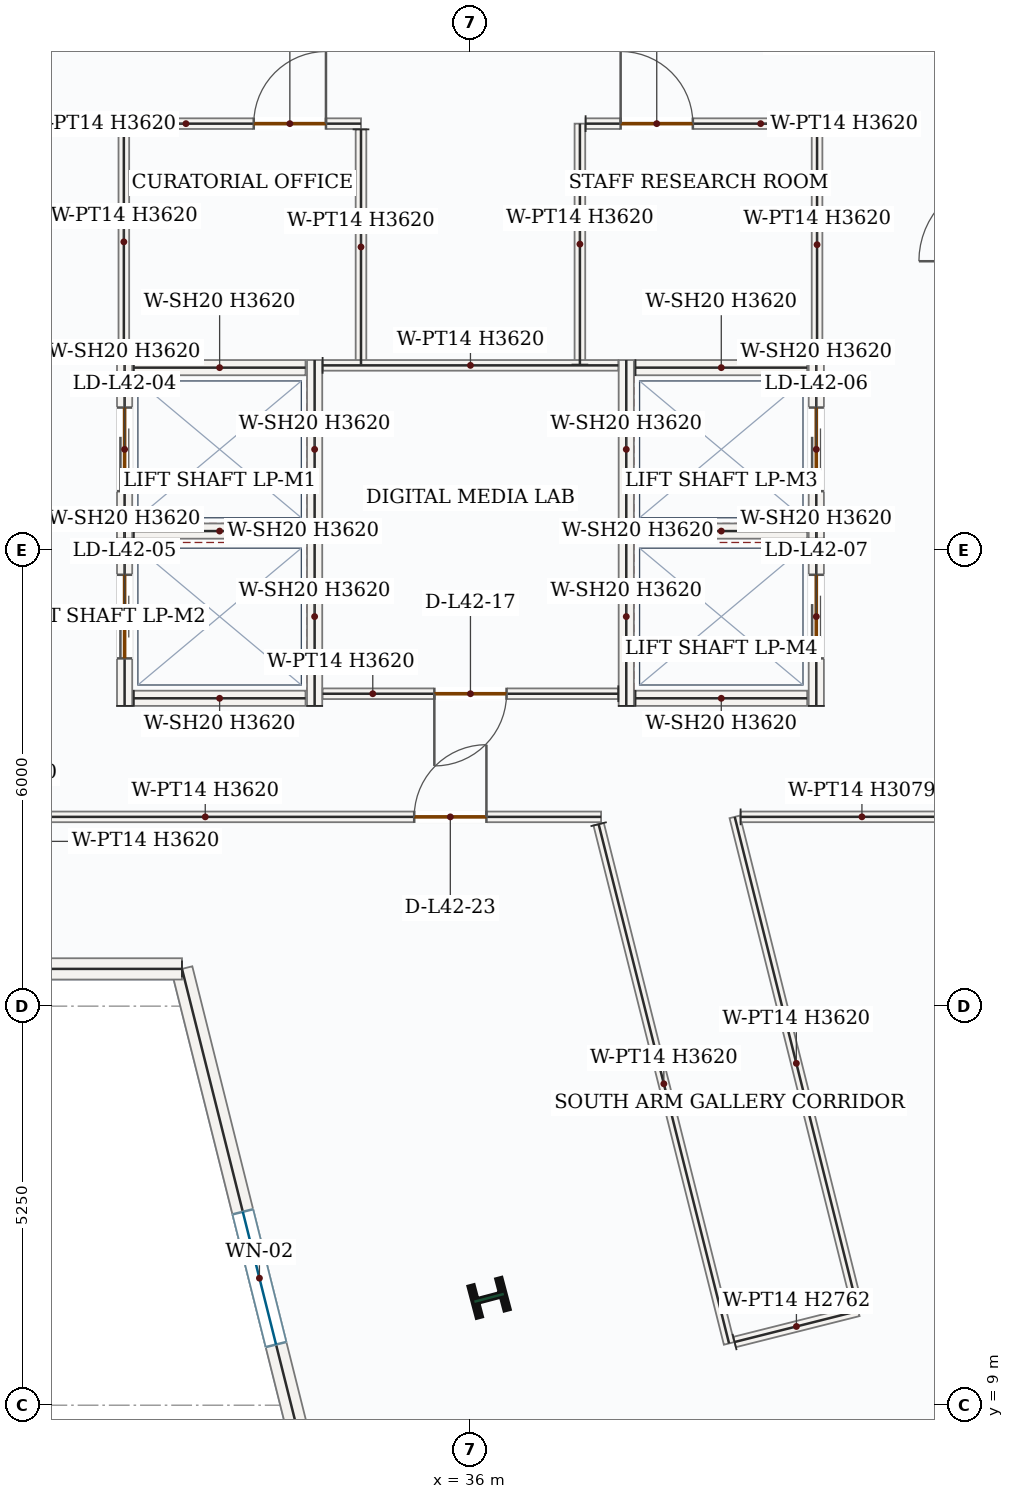
"""IFC4 building model, lengths in metres.
Left out: names, types, materials, properties, quantities, classifications, styles, units other than length and angle.
Written with IfcOpenShell. Run it as: python <this file> out.ifc"""

import sys

from ifc_helpers import new_model, si_unit, direction, frame, frame_2d, origin, origin_2d, place, context, subcontext, project, spatial, rectangle, i_section, extrude, source, transform, mapped, element, fill, save


model = new_model("IFC4")
c1 = context("Model", 3, precision=1e-05, world=origin(), true_north=direction((0.0, 1.0)))
c2 = subcontext(c1, "Body", "Model", "MODEL_VIEW")
j1 = project(units=[si_unit("LENGTHUNIT", "METRE"), si_unit("PLANEANGLEUNIT", "RADIAN")], contexts=[c1])
p1 = place(None, origin())
s1 = spatial("IfcSite", under=j1, at=p1, CompositionType="ELEMENT")
p2 = place(p1, origin())
s2 = spatial("IfcBuilding", under=s1, at=p2, CompositionType="ELEMENT")
p3 = place(p2, frame((0.0, 0.0, 182.4)))
s3 = spatial("IfcBuildingStorey", under=s2, at=p3, CompositionType="ELEMENT", Elevation=182.4)
m1 = source(origin(), c2, "Body", "SweptSolid", [
    extrude(i_section(OverallWidth=0.412, OverallDepth=0.435, WebThickness=0.036, FlangeThickness=0.057, FilletRadius=0.018, at=origin_2d()), origin(), (0.0, 0.0, 1.0), 3.9),
])
p4 = place(p3, frame((36.245, 10.412, 0.0), z_axis=(0.0, 0.0, 1.0), x_axis=(-0.255445757936, 0.966823388604, 0.0)))
e1 = element("IfcColumn", 1, at=p4, inside=s3, PredefinedType="COLUMN", context=c2, shape_type="MappedRepresentation", body=[
    mapped(m1, transform((0.0, 0.0, 0.0), x_axis=(1.0, 0.0, 0.0), y_axis=(0.0, 1.0, 0.0), z_axis=(0.0, 0.0, 1.0), scale=1.0)),
])
p5 = place(p3, frame((34.243, 6.602, 0.0), z_axis=(0.0, 0.0, 1.0), x_axis=(-0.242939601766, 0.970041416587, 0.0)))
e2 = element("IfcWall", 2, at=p5, inside=s3, PredefinedType="SOLIDWALL", context=c2, shape_type="SweptSolid", body=[
    extrude(rectangle(XDim=8.389, YDim=0.28, at=frame_2d((4.195, 0.0))), origin(), (0.0, 0.0, 1.0), 3.62),
])
p6 = place(p5, frame((3.295, 0.0, 0.85)))
e3 = element("IfcOpeningElement", 3, at=p6, cuts=e2, PredefinedType="OPENING", context=c2, shape_type="SweptSolid", body=[
    extrude(rectangle(XDim=1.8, YDim=1.75, at=frame_2d((0.9, 0.875))), frame((0.0, 0.15, 0.0), z_axis=(0.0, -1.0, 0.0), x_axis=(1.0, 0.0, 0.0)), (0.0, 0.0, 1.0), 0.3),
])
p7 = place(p3, frame((32.205, 14.74, 0.0), z_axis=(0.0, 0.0, 1.0), x_axis=(-1.0, 0.0, 0.0)))
e4 = element("IfcWall", 4, at=p7, inside=s3, PredefinedType="SOLIDWALL", context=c2, shape_type="SweptSolid", body=[
    extrude(rectangle(XDim=9.547, YDim=0.28, at=frame_2d((4.773, 0.0))), origin(), (0.0, 0.0, 1.0), 3.62),
])
p8 = place(p7, frame((3.873, 0.0, 0.85)))
e5 = element("IfcOpeningElement", 5, at=p8, cuts=e4, PredefinedType="OPENING", context=c2, shape_type="SweptSolid", body=[
    extrude(rectangle(XDim=1.8, YDim=1.75, at=frame_2d((0.9, 0.875))), frame((0.0, 0.15, 0.0), z_axis=(0.0, -1.0, 0.0), x_axis=(1.0, 0.0, 0.0)), (0.0, 0.0, 1.0), 0.3),
])
p9 = place(p3, frame((31.45, 20.4, 0.0), z_axis=(0.0, 0.0, 1.0), x_axis=(0.0, 1.0, 0.0)))
e6 = element("IfcWall", 6, at=p9, inside=s3, PredefinedType="SOLIDWALL", context=c2, shape_type="SweptSolid", body=[
    extrude(rectangle(XDim=2.35, YDim=0.2, at=frame_2d((1.175, 0.0))), origin(), (0.0, 0.0, 1.0), 3.62),
])
p10 = place(p9, frame((0.625, 0.0, 0.0)))
e7 = element("IfcOpeningElement", 7, at=p10, cuts=e6, PredefinedType="OPENING", context=c2, shape_type="SweptSolid", body=[
    extrude(rectangle(XDim=1.1, YDim=2.15, at=frame_2d((0.55, 1.075))), frame((0.0, 0.11, 0.0), z_axis=(0.0, -1.0, 0.0), x_axis=(1.0, 0.0, 0.0)), (0.0, 0.0, 1.0), 0.22),
])
m2 = source(origin(), c2, "Body", "SweptSolid", [
    extrude(rectangle(XDim=2.35, YDim=0.2, at=frame_2d((1.175, 0.0))), origin(), (0.0, 0.0, 1.0), 3.62),
])
p11 = place(p3, frame((33.95, 20.4, 0.0), z_axis=(0.0, 0.0, 1.0), x_axis=(0.0, 1.0, 0.0)))
e8 = element("IfcWall", 8, at=p11, inside=s3, PredefinedType="SOLIDWALL", context=c2, shape_type="MappedRepresentation", body=[
    mapped(m2, transform((0.0, 0.0, 0.0), x_axis=(1.0, 0.0, 0.0), y_axis=(0.0, 1.0, 0.0), z_axis=(0.0, 0.0, 1.0), scale=1.0)),
])
m3 = source(origin(), c2, "Body", "SweptSolid", [
    extrude(rectangle(XDim=2.26, YDim=0.2, at=frame_2d((1.13, 0.0))), origin(), (0.0, 0.0, 1.0), 3.62),
])
for number, where, z_axis, x_axis in (
    (9, (31.57, 20.5, 0.0), (0.0, 0.0, 1.0), (1.0, 0.0, 0.0)),
    (10, (31.57, 22.65, 0.0), (0.0, 0.0, 1.0), (1.0, 0.0, 0.0)),
):
    element("IfcWall", number, at=place(p3, frame(where, z_axis=z_axis, x_axis=x_axis)), inside=s3, PredefinedType="SOLIDWALL", context=c2, shape_type="MappedRepresentation", body=[
        mapped(m3, transform((0.0, 0.0, 0.0), x_axis=(1.0, 0.0, 0.0), y_axis=(0.0, 1.0, 0.0), z_axis=(0.0, 0.0, 1.0), scale=1.0)),
    ])
p12 = place(p3, frame((31.45, 18.2, 0.0), z_axis=(0.0, 0.0, 1.0), x_axis=(0.0, 1.0, 0.0)))
e11 = element("IfcWall", 11, at=p12, inside=s3, PredefinedType="SOLIDWALL", context=c2, shape_type="SweptSolid", body=[
    extrude(rectangle(XDim=2.35, YDim=0.2, at=frame_2d((1.175, 0.0))), origin(), (0.0, 0.0, 1.0), 3.62),
])
p13 = place(p12, frame((0.625, 0.0, 0.0)))
e12 = element("IfcOpeningElement", 12, at=p13, cuts=e11, PredefinedType="OPENING", context=c2, shape_type="SweptSolid", body=[
    extrude(rectangle(XDim=1.1, YDim=2.15, at=frame_2d((0.55, 1.075))), frame((0.0, 0.11, 0.0), z_axis=(0.0, -1.0, 0.0), x_axis=(1.0, 0.0, 0.0)), (0.0, 0.0, 1.0), 0.22),
])
p14 = place(p3, frame((33.95, 18.2, 0.0), z_axis=(0.0, 0.0, 1.0), x_axis=(0.0, 1.0, 0.0)))
e13 = element("IfcWall", 13, at=p14, inside=s3, PredefinedType="SOLIDWALL", context=c2, shape_type="MappedRepresentation", body=[
    mapped(m2, transform((0.0, 0.0, 0.0), x_axis=(1.0, 0.0, 0.0), y_axis=(0.0, 1.0, 0.0), z_axis=(0.0, 0.0, 1.0), scale=1.0)),
])
p15 = place(p3, frame((31.57, 18.3, 0.0), z_axis=(0.0, 0.0, 1.0), x_axis=(1.0, 0.0, 0.0)))
e14 = element("IfcWall", 14, at=p15, inside=s3, PredefinedType="SOLIDWALL", context=c2, shape_type="MappedRepresentation", body=[
    mapped(m3, transform((0.0, 0.0, 0.0), x_axis=(1.0, 0.0, 0.0), y_axis=(0.0, 1.0, 0.0), z_axis=(0.0, 0.0, 1.0), scale=1.0)),
])
p16 = place(p3, frame((38.05, 20.4, 0.0), z_axis=(0.0, 0.0, 1.0), x_axis=(0.0, 1.0, 0.0)))
e15 = element("IfcWall", 15, at=p16, inside=s3, PredefinedType="SOLIDWALL", context=c2, shape_type="MappedRepresentation", body=[
    mapped(m2, transform((0.0, 0.0, 0.0), x_axis=(1.0, 0.0, 0.0), y_axis=(0.0, 1.0, 0.0), z_axis=(0.0, 0.0, 1.0), scale=1.0)),
])
p17 = place(p3, frame((40.55, 20.4, 0.0), z_axis=(0.0, 0.0, 1.0), x_axis=(0.0, 1.0, 0.0)))
e16 = element("IfcWall", 16, at=p17, inside=s3, PredefinedType="SOLIDWALL", context=c2, shape_type="SweptSolid", body=[
    extrude(rectangle(XDim=2.35, YDim=0.2, at=frame_2d((1.175, 0.0))), origin(), (0.0, 0.0, 1.0), 3.62),
])
p18 = place(p17, frame((0.625, 0.0, 0.0)))
e17 = element("IfcOpeningElement", 17, at=p18, cuts=e16, PredefinedType="OPENING", context=c2, shape_type="SweptSolid", body=[
    extrude(rectangle(XDim=1.1, YDim=2.15, at=frame_2d((0.55, 1.075))), frame((0.0, 0.11, 0.0), z_axis=(0.0, -1.0, 0.0), x_axis=(1.0, 0.0, 0.0)), (0.0, 0.0, 1.0), 0.22),
])
for number, where, z_axis, x_axis in (
    (18, (38.17, 20.5, 0.0), (0.0, 0.0, 1.0), (1.0, 0.0, 0.0)),
    (19, (38.17, 22.65, 0.0), (0.0, 0.0, 1.0), (1.0, 0.0, 0.0)),
):
    element("IfcWall", number, at=place(p3, frame(where, z_axis=z_axis, x_axis=x_axis)), inside=s3, PredefinedType="SOLIDWALL", context=c2, shape_type="MappedRepresentation", body=[
        mapped(m3, transform((0.0, 0.0, 0.0), x_axis=(1.0, 0.0, 0.0), y_axis=(0.0, 1.0, 0.0), z_axis=(0.0, 0.0, 1.0), scale=1.0)),
    ])
p19 = place(p3, frame((38.05, 18.2, 0.0), z_axis=(0.0, 0.0, 1.0), x_axis=(0.0, 1.0, 0.0)))
e20 = element("IfcWall", 20, at=p19, inside=s3, PredefinedType="SOLIDWALL", context=c2, shape_type="MappedRepresentation", body=[
    mapped(m2, transform((0.0, 0.0, 0.0), x_axis=(1.0, 0.0, 0.0), y_axis=(0.0, 1.0, 0.0), z_axis=(0.0, 0.0, 1.0), scale=1.0)),
])
p20 = place(p3, frame((40.55, 18.2, 0.0), z_axis=(0.0, 0.0, 1.0), x_axis=(0.0, 1.0, 0.0)))
e21 = element("IfcWall", 21, at=p20, inside=s3, PredefinedType="SOLIDWALL", context=c2, shape_type="SweptSolid", body=[
    extrude(rectangle(XDim=2.35, YDim=0.2, at=frame_2d((1.175, 0.0))), origin(), (0.0, 0.0, 1.0), 3.62),
])
p21 = place(p20, frame((0.625, 0.0, 0.0)))
e22 = element("IfcOpeningElement", 22, at=p21, cuts=e21, PredefinedType="OPENING", context=c2, shape_type="SweptSolid", body=[
    extrude(rectangle(XDim=1.1, YDim=2.15, at=frame_2d((0.55, 1.075))), frame((0.0, 0.11, 0.0), z_axis=(0.0, -1.0, 0.0), x_axis=(1.0, 0.0, 0.0)), (0.0, 0.0, 1.0), 0.22),
])
p22 = place(p3, frame((38.17, 18.3, 0.0), z_axis=(0.0, 0.0, 1.0), x_axis=(1.0, 0.0, 0.0)))
e23 = element("IfcWall", 23, at=p22, inside=s3, PredefinedType="SOLIDWALL", context=c2, shape_type="MappedRepresentation", body=[
    mapped(m3, transform((0.0, 0.0, 0.0), x_axis=(1.0, 0.0, 0.0), y_axis=(0.0, 1.0, 0.0), z_axis=(0.0, 0.0, 1.0), scale=1.0)),
])
m4 = source(origin(), c2, "Body", "SweptSolid", [
    extrude(rectangle(XDim=3.11, YDim=0.14, at=frame_2d((1.555, 0.0))), origin(), (0.0, 0.0, 1.0), 3.62),
])
p23 = place(p3, frame((31.44, 22.75, 0.0), z_axis=(0.0, 0.0, 1.0), x_axis=(0.0, 1.0, 0.0)))
e24 = element("IfcWall", 24, at=p23, inside=s3, PredefinedType="PARTITIONING", context=c2, shape_type="MappedRepresentation", body=[
    mapped(m4, transform((0.0, 0.0, 0.0), x_axis=(1.0, 0.0, 0.0), y_axis=(0.0, 1.0, 0.0), z_axis=(0.0, 0.0, 1.0), scale=1.0)),
])
p24 = place(p3, frame((31.515, 25.86, 0.0), z_axis=(0.0, 0.0, 1.0), x_axis=(1.0, 0.0, 0.0)))
e25 = element("IfcWall", 25, at=p24, inside=s3, PredefinedType="PARTITIONING", context=c2, shape_type="SweptSolid", body=[
    extrude(rectangle(XDim=3.045, YDim=0.14, at=frame_2d((1.522, 0.0))), origin(), (0.0, 0.0, 1.0), 3.62),
])
p25 = place(p24, frame((1.634, 0.0, 0.0)))
e26 = element("IfcOpeningElement", 26, at=p25, cuts=e25, PredefinedType="OPENING", context=c2, shape_type="SweptSolid", body=[
    extrude(rectangle(XDim=0.95, YDim=2.15, at=frame_2d((0.475, 1.075))), frame((0.0, 0.08, 0.0), z_axis=(0.0, -1.0, 0.0), x_axis=(1.0, 0.0, 0.0)), (0.0, 0.0, 1.0), 0.16),
])
m5 = source(origin(), c2, "Body", "SweptSolid", [
    extrude(rectangle(XDim=3.095, YDim=0.14, at=frame_2d((1.547, 0.0))), origin(), (0.0, 0.0, 1.0), 3.62),
])
p26 = place(p3, frame((34.56, 25.785, 0.0), z_axis=(0.0, 0.0, 1.0), x_axis=(0.0, -1.0, 0.0)))
e27 = element("IfcWall", 27, at=p26, inside=s3, PredefinedType="PARTITIONING", context=c2, shape_type="MappedRepresentation", body=[
    mapped(m5, transform((0.0, 0.0, 0.0), x_axis=(1.0, 0.0, 0.0), y_axis=(0.0, 1.0, 0.0), z_axis=(0.0, 0.0, 1.0), scale=1.0)),
])
m6 = source(origin(), c2, "Body", "SweptSolid", [
    extrude(rectangle(XDim=3.17, YDim=0.14, at=frame_2d((1.585, 0.0))), origin(), (0.0, 0.0, 1.0), 3.62),
])
p27 = place(p3, frame((37.44, 22.69, 0.0), z_axis=(0.0, 0.0, 1.0), x_axis=(0.0, 1.0, 0.0)))
e28 = element("IfcWall", 28, at=p27, inside=s3, PredefinedType="PARTITIONING", context=c2, shape_type="MappedRepresentation", body=[
    mapped(m6, transform((0.0, 0.0, 0.0), x_axis=(1.0, 0.0, 0.0), y_axis=(0.0, 1.0, 0.0), z_axis=(0.0, 0.0, 1.0), scale=1.0)),
])
p28 = place(p3, frame((37.515, 25.86, 0.0), z_axis=(0.0, 0.0, 1.0), x_axis=(1.0, 0.0, 0.0)))
e29 = element("IfcWall", 29, at=p28, inside=s3, PredefinedType="PARTITIONING", context=c2, shape_type="SweptSolid", body=[
    extrude(rectangle(XDim=3.045, YDim=0.14, at=frame_2d((1.522, 0.0))), origin(), (0.0, 0.0, 1.0), 3.62),
])
p29 = place(p28, frame((0.461, 0.0, 0.0)))
e30 = element("IfcOpeningElement", 30, at=p29, cuts=e29, PredefinedType="OPENING", context=c2, shape_type="SweptSolid", body=[
    extrude(rectangle(XDim=0.95, YDim=2.15, at=frame_2d((0.475, 1.075))), frame((0.0, 0.08, 0.0), z_axis=(0.0, -1.0, 0.0), x_axis=(1.0, 0.0, 0.0)), (0.0, 0.0, 1.0), 0.16),
])
m7 = source(origin(), c2, "Body", "SweptSolid", [
    extrude(rectangle(XDim=3.035, YDim=0.14, at=frame_2d((1.518, 0.0))), origin(), (0.0, 0.0, 1.0), 3.62),
])
p30 = place(p3, frame((40.56, 25.785, 0.0), z_axis=(0.0, 0.0, 1.0), x_axis=(0.0, -1.0, 0.0)))
e31 = element("IfcWall", 31, at=p30, inside=s3, PredefinedType="PARTITIONING", context=c2, shape_type="MappedRepresentation", body=[
    mapped(m7, transform((0.0, 0.0, 0.0), x_axis=(1.0, 0.0, 0.0), y_axis=(0.0, 1.0, 0.0), z_axis=(0.0, 0.0, 1.0), scale=1.0)),
])
m8 = source(origin(), c2, "Body", "SweptSolid", [
    extrude(rectangle(XDim=3.89, YDim=0.14, at=frame_2d((1.945, 0.0))), origin(), (0.0, 0.0, 1.0), 3.62),
])
p31 = place(p3, frame((34.055, 22.68, 0.0), z_axis=(0.0, 0.0, 1.0), x_axis=(1.0, 0.0, 0.0)))
e32 = element("IfcWall", 32, at=p31, inside=s3, PredefinedType="PARTITIONING", context=c2, shape_type="MappedRepresentation", body=[
    mapped(m8, transform((0.0, 0.0, 0.0), x_axis=(1.0, 0.0, 0.0), y_axis=(0.0, 1.0, 0.0), z_axis=(0.0, 0.0, 1.0), scale=1.0)),
])
p32 = place(p3, frame((37.945, 18.36, 0.0), z_axis=(0.0, 0.0, 1.0), x_axis=(-1.0, 0.0, 0.0)))
e33 = element("IfcWall", 33, at=p32, inside=s3, PredefinedType="PARTITIONING", context=c2, shape_type="SweptSolid", body=[
    extrude(rectangle(XDim=3.89, YDim=0.14, at=frame_2d((1.945, 0.0))), origin(), (0.0, 0.0, 1.0), 3.62),
])
p33 = place(p32, frame((1.47, 0.0, 0.0)))
e34 = element("IfcOpeningElement", 34, at=p33, cuts=e33, PredefinedType="OPENING", context=c2, shape_type="SweptSolid", body=[
    extrude(rectangle(XDim=0.95, YDim=2.15, at=frame_2d((0.475, 1.075))), frame((0.0, 0.08, 0.0), z_axis=(0.0, -1.0, 0.0), x_axis=(1.0, 0.0, 0.0)), (0.0, 0.0, 1.0), 0.16),
])
p34 = place(p3, frame((29.912, 16.74, 0.0), z_axis=(0.0, 0.0, 1.0), x_axis=(1.0, 0.0, 0.0)))
e35 = element("IfcWall", 35, at=p34, inside=s3, PredefinedType="PARTITIONING", context=c2, shape_type="SweptSolid", body=[
    extrude(rectangle(XDim=7.806, YDim=0.14, at=frame_2d((3.903, 0.0))), origin(), (0.0, 0.0, 1.0), 3.62),
])
p35 = place(p34, frame((5.348, 0.0, 0.0)))
e36 = element("IfcOpeningElement", 36, at=p35, cuts=e35, PredefinedType="OPENING", context=c2, shape_type="SweptSolid", body=[
    extrude(rectangle(XDim=0.95, YDim=2.15, at=frame_2d((0.475, 1.075))), frame((0.0, 0.08, 0.0), z_axis=(0.0, -1.0, 0.0), x_axis=(1.0, 0.0, 0.0)), (0.0, 0.0, 1.0), 0.16),
])
m9 = source(origin(), c2, "Body", "SweptSolid", [
    extrude(rectangle(XDim=7.043, YDim=0.14, at=frame_2d((3.521, 0.0))), origin(), (0.0, 0.0, 1.0), 3.62),
])
p36 = place(p3, frame((37.687, 16.644, 0.0), z_axis=(0.0, 0.0, 1.0), x_axis=(0.243587652837, -0.969878886968, 0.0)))
e37 = element("IfcWall", 37, at=p36, inside=s3, PredefinedType="PARTITIONING", context=c2, shape_type="MappedRepresentation", body=[
    mapped(m9, transform((0.0, 0.0, 0.0), x_axis=(1.0, 0.0, 0.0), y_axis=(0.0, 1.0, 0.0), z_axis=(0.0, 0.0, 1.0), scale=1.0)),
])
m10 = source(origin(), c2, "Body", "SweptSolid", [
    extrude(rectangle(XDim=1.678, YDim=0.14, at=frame_2d((0.839, 0.0))), origin(), (0.0, 0.0, 1.0), 2.762),
])
p37 = place(p3, frame((39.475, 9.831, 0.0), z_axis=(0.0, 0.0, 1.0), x_axis=(0.969799114262, 0.243905059349, 0.0)))
e38 = element("IfcWall", 38, at=p37, inside=s3, PredefinedType="PARTITIONING", context=c2, shape_type="MappedRepresentation", body=[
    mapped(m10, transform((0.0, 0.0, 0.0), x_axis=(1.0, 0.0, 0.0), y_axis=(0.0, 1.0, 0.0), z_axis=(0.0, 0.0, 1.0), scale=1.0)),
])
m11 = source(origin(), c2, "Body", "SweptSolid", [
    extrude(rectangle(XDim=6.684, YDim=0.14, at=frame_2d((3.342, 0.0))), origin(), (0.0, 0.0, 1.0), 3.62),
])
p38 = place(p3, frame((41.098, 10.256, 0.0), z_axis=(0.0, 0.0, 1.0), x_axis=(-0.24254421979, 0.970140351416, 0.0)))
e39 = element("IfcWall", 39, at=p38, inside=s3, PredefinedType="PARTITIONING", context=c2, shape_type="MappedRepresentation", body=[
    mapped(m11, transform((0.0, 0.0, 0.0), x_axis=(1.0, 0.0, 0.0), y_axis=(0.0, 1.0, 0.0), z_axis=(0.0, 0.0, 1.0), scale=1.0)),
])
m12 = source(origin(), c2, "Body", "SweptSolid", [
    extrude(rectangle(XDim=3.192, YDim=0.14, at=frame_2d((1.596, 0.0))), origin(), (0.0, 0.0, 1.0), 3.079),
])
p39 = place(p3, frame((39.554, 16.74, 0.0), z_axis=(0.0, 0.0, 1.0), x_axis=(0.999999926893, 0.000382379905, 0.0)))
e40 = element("IfcWall", 40, at=p39, inside=s3, PredefinedType="PARTITIONING", context=c2, shape_type="MappedRepresentation", body=[
    mapped(m12, transform((0.0, 0.0, 0.0), x_axis=(1.0, 0.0, 0.0), y_axis=(0.0, 1.0, 0.0), z_axis=(0.0, 0.0, 1.0), scale=1.0)),
])
m13 = source(origin(), c2, "Body", "SweptSolid", [
    extrude(rectangle(XDim=1.8, YDim=1.75, at=frame_2d((0.9, 0.875))), frame((0.0, 0.03, 0.0), z_axis=(0.0, -1.0, 0.0), x_axis=(1.0, 0.0, 0.0)), (0.0, 0.0, 1.0), 0.06),
])
p40 = place(p6, origin())
e41 = element("IfcWindow", 41, at=p40, inside=s3, PartitioningType="DOUBLE_PANEL_VERTICAL", PredefinedType="WINDOW", context=c2, shape_type="MappedRepresentation", body=[
    mapped(m13, transform((0.0, 0.0, 0.0), x_axis=(1.0, 0.0, 0.0), y_axis=(0.0, 1.0, 0.0), z_axis=(0.0, 0.0, 1.0), scale=1.0)),
])
fill(e3, e41)
m14 = source(origin(), c2, "Body", "SweptSolid", [
    extrude(rectangle(XDim=1.1, YDim=2.15, at=frame_2d((0.55, 1.075))), frame((0.0, 0.025, 0.0), z_axis=(0.0, -1.0, 0.0), x_axis=(1.0, 0.0, 0.0)), (0.0, 0.0, 1.0), 0.05),
])
p41 = place(p10, origin())
e42 = element("IfcDoor", 42, at=p41, inside=s3, OperationType="DOUBLE_DOOR_SLIDING", PredefinedType="DOOR", context=c2, shape_type="MappedRepresentation", body=[
    mapped(m14, transform((0.0, 0.0, 0.0), x_axis=(1.0, 0.0, 0.0), y_axis=(0.0, 1.0, 0.0), z_axis=(0.0, 0.0, 1.0), scale=1.0)),
])
fill(e7, e42)
p42 = place(p13, origin())
e43 = element("IfcDoor", 43, at=p42, inside=s3, OperationType="DOUBLE_DOOR_SLIDING", PredefinedType="DOOR", context=c2, shape_type="MappedRepresentation", body=[
    mapped(m14, transform((0.0, 0.0, 0.0), x_axis=(1.0, 0.0, 0.0), y_axis=(0.0, 1.0, 0.0), z_axis=(0.0, 0.0, 1.0), scale=1.0)),
])
fill(e12, e43)
p43 = place(p18, origin())
e44 = element("IfcDoor", 44, at=p43, inside=s3, OperationType="DOUBLE_DOOR_SLIDING", PredefinedType="DOOR", context=c2, shape_type="MappedRepresentation", body=[
    mapped(m14, transform((0.0, 0.0, 0.0), x_axis=(1.0, 0.0, 0.0), y_axis=(0.0, 1.0, 0.0), z_axis=(0.0, 0.0, 1.0), scale=1.0)),
])
fill(e17, e44)
p44 = place(p21, origin())
e45 = element("IfcDoor", 45, at=p44, inside=s3, OperationType="DOUBLE_DOOR_SLIDING", PredefinedType="DOOR", context=c2, shape_type="MappedRepresentation", body=[
    mapped(m14, transform((0.0, 0.0, 0.0), x_axis=(1.0, 0.0, 0.0), y_axis=(0.0, 1.0, 0.0), z_axis=(0.0, 0.0, 1.0), scale=1.0)),
])
fill(e22, e45)
m15 = source(origin(), c2, "Body", "SweptSolid", [
    extrude(rectangle(XDim=0.95, YDim=2.15, at=frame_2d((0.475, 1.075))), frame((0.0, 0.025, 0.0), z_axis=(0.0, -1.0, 0.0), x_axis=(1.0, 0.0, 0.0)), (0.0, 0.0, 1.0), 0.05),
])
p45 = place(p25, origin())
e46 = element("IfcDoor", 46, at=p45, inside=s3, OperationType="SINGLE_SWING_RIGHT", PredefinedType="DOOR", context=c2, shape_type="MappedRepresentation", body=[
    mapped(m15, transform((0.0, 0.0, 0.0), x_axis=(1.0, 0.0, 0.0), y_axis=(0.0, 1.0, 0.0), z_axis=(0.0, 0.0, 1.0), scale=1.0)),
])
fill(e26, e46)
p46 = place(p29, origin())
e47 = element("IfcDoor", 47, at=p46, inside=s3, OperationType="SINGLE_SWING_LEFT", PredefinedType="DOOR", context=c2, shape_type="MappedRepresentation", body=[
    mapped(m15, transform((0.0, 0.0, 0.0), x_axis=(1.0, 0.0, 0.0), y_axis=(0.0, 1.0, 0.0), z_axis=(0.0, 0.0, 1.0), scale=1.0)),
])
fill(e30, e47)
p47 = place(p33, origin())
e48 = element("IfcDoor", 48, at=p47, inside=s3, OperationType="SINGLE_SWING_RIGHT", PredefinedType="DOOR", context=c2, shape_type="MappedRepresentation", body=[
    mapped(m15, transform((0.0, 0.0, 0.0), x_axis=(1.0, 0.0, 0.0), y_axis=(0.0, 1.0, 0.0), z_axis=(0.0, 0.0, 1.0), scale=1.0)),
])
fill(e34, e48)
p48 = place(p35, origin())
e49 = element("IfcDoor", 49, at=p48, inside=s3, OperationType="SINGLE_SWING_RIGHT", PredefinedType="DOOR", context=c2, shape_type="MappedRepresentation", body=[
    mapped(m15, transform((0.0, 0.0, 0.0), x_axis=(1.0, 0.0, 0.0), y_axis=(0.0, 1.0, 0.0), z_axis=(0.0, 0.0, 1.0), scale=1.0)),
])
fill(e36, e49)
save(model, sys.argv[1])
